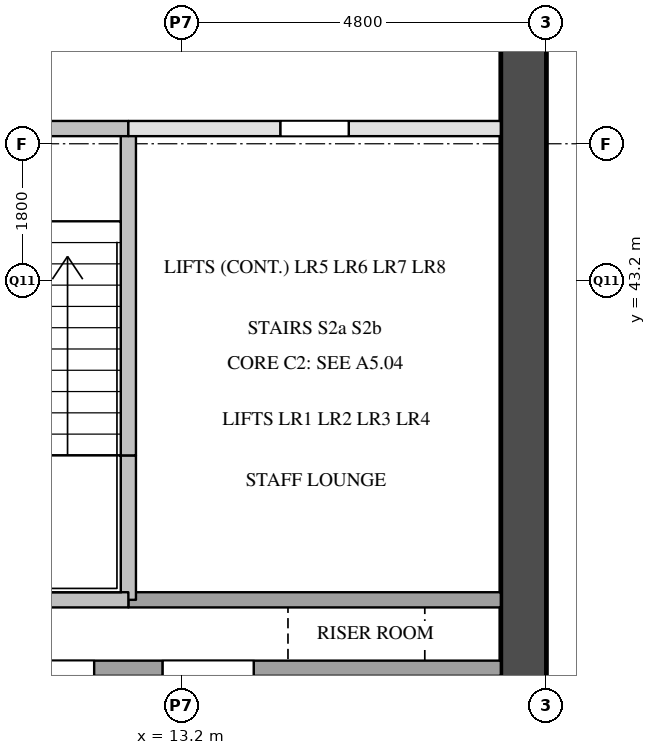
"""IFC4 building model, lengths in metres.
Left out: names, types, materials, properties, quantities, classifications, styles, units other than length and angle.
Written with IfcOpenShell. Run it as: python <this file> out.ifc"""

import sys

from ifc_helpers import new_model, si_unit, direction, frame, frame_2d, origin, place, context, subcontext, project, spatial, rectangle, extrude, element, fill, save


model = new_model("IFC4")
c1 = context("Model", 3, precision=1e-05, world=origin(), true_north=direction((0.0, 1.0)))
c2 = subcontext(c1, "Body", "Model", "MODEL_VIEW")
j1 = project(units=[si_unit("LENGTHUNIT", "METRE"), si_unit("PLANEANGLEUNIT", "RADIAN")], contexts=[c1])
p1 = place(None, origin())
s1 = spatial("IfcSite", under=j1, at=p1, CompositionType="ELEMENT")
p2 = place(p1, origin())
s2 = spatial("IfcBuilding", under=s1, at=p2, CompositionType="ELEMENT")
p3 = place(p2, frame((0.0, 0.0, 100.6)))
s3 = spatial("IfcBuildingStorey", under=s2, at=p3, CompositionType="ELEMENT", Elevation=100.6)
p4 = place(p3, frame((17.7, 29.1, 0.0), z_axis=(0.0, 0.0, 1.0), x_axis=(0.0, 1.0, 0.0)))
e1 = element("IfcWall", 1, at=p4, inside=s3, PredefinedType="SHEAR", context=c2, shape_type="SweptSolid", body=[
    extrude(rectangle(XDim=20.3, YDim=0.6, at=frame_2d((10.15, 0.0))), origin(), (0.0, 0.0, 1.0), 3.5),
])
p5 = place(p4, frame((1.25, 0.0, 0.0)))
e2 = element("IfcOpeningElement", 2, at=p5, cuts=e1, PredefinedType="OPENING", context=c2, shape_type="SweptSolid", body=[
    extrude(rectangle(XDim=0.7, YDim=2.1, at=frame_2d((0.35, 1.05))), frame((0.0, 0.31, 0.0), z_axis=(0.0, -1.0, 0.0), x_axis=(1.0, 0.0, 0.0)), (0.0, 0.0, 1.0), 0.62),
])
p6 = place(p4, frame((7.05, 0.0, 0.0)))
e3 = element("IfcOpeningElement", 3, at=p6, cuts=e1, PredefinedType="OPENING", context=c2, shape_type="SweptSolid", body=[
    extrude(rectangle(XDim=0.7, YDim=2.1, at=frame_2d((0.35, 1.05))), frame((0.0, 0.31, 0.0), z_axis=(0.0, -1.0, 0.0), x_axis=(1.0, 0.0, 0.0)), (0.0, 0.0, 1.0), 0.62),
])
p7 = place(p3, frame((12.5, 34.9, 0.0), z_axis=(0.0, 0.0, 1.0), x_axis=(0.0, 1.0, 0.0)))
e4 = element("IfcWall", 4, at=p7, inside=s3, PredefinedType="SOLIDWALL", context=c2, shape_type="SweptSolid", body=[
    extrude(rectangle(XDim=3.2, YDim=0.2, at=frame_2d((1.6, 0.0))), origin(), (0.0, 0.0, 1.0), 3.5),
])
p8 = place(p3, frame((12.5, 39.0, 0.0), z_axis=(0.0, 0.0, 1.0), x_axis=(0.0, 1.0, 0.0)))
e5 = element("IfcWall", 5, at=p8, inside=s3, PredefinedType="SOLIDWALL", context=c2, shape_type="SweptSolid", body=[
    extrude(rectangle(XDim=1.9, YDim=0.2, at=frame_2d((0.95, 0.0))), origin(), (0.0, 0.0, 1.0), 3.5),
])
p9 = place(p3, frame((12.5, 40.9, 0.0), z_axis=(0.0, 0.0, 1.0), x_axis=(0.0, 1.0, 0.0)))
e6 = element("IfcWall", 6, at=p9, inside=s3, PredefinedType="SOLIDWALL", context=c2, shape_type="SweptSolid", body=[
    extrude(rectangle(XDim=4.3, YDim=0.2, at=frame_2d((2.15, 0.0))), origin(), (0.0, 0.0, 1.0), 3.5),
])
for number, where, z_axis, x_axis in (
    (7, (14.6, 34.9, 0.0), (0.0, 0.0, 1.0), (0.0, 1.0, 0.0)),
    (8, (16.7, 34.9, 0.0), (0.0, 0.0, 1.0), (0.0, 1.0, 0.0)),
):
    element("IfcWall", number, at=place(p3, frame(where, z_axis=z_axis, x_axis=x_axis)), inside=s3, PredefinedType="SOLIDWALL", context=c2, shape_type="SweptSolid", body=[
        extrude(rectangle(XDim=3.2, YDim=0.2, at=frame_2d((1.6, 0.0))), origin(), (0.0, 0.0, 1.0), 3.5),
    ])
p10 = place(p3, frame((6.2, 38.1, 0.0), z_axis=(0.0, 0.0, 1.0), x_axis=(1.0, 0.0, 0.0)))
e9 = element("IfcWall", 9, at=p10, inside=s3, PredefinedType="SOLIDWALL", context=c2, shape_type="SweptSolid", body=[
    extrude(rectangle(XDim=11.2, YDim=0.2, at=frame_2d((5.6, 0.0))), origin(), (0.0, 0.0, 1.0), 3.5),
])
p11 = place(p10, frame((0.45, 0.0, 0.0)))
e10 = element("IfcOpeningElement", 10, at=p11, cuts=e9, PredefinedType="OPENING", context=c2, shape_type="SweptSolid", body=[
    extrude(rectangle(XDim=1.2, YDim=2.1, at=frame_2d((0.6, 1.05))), frame((0.0, 0.11, 0.0), z_axis=(0.0, -1.0, 0.0), x_axis=(1.0, 0.0, 0.0)), (0.0, 0.0, 1.0), 0.22),
])
p12 = place(p10, frame((2.55, 0.0, 0.0)))
e11 = element("IfcOpeningElement", 11, at=p12, cuts=e9, PredefinedType="OPENING", context=c2, shape_type="SweptSolid", body=[
    extrude(rectangle(XDim=1.2, YDim=2.1, at=frame_2d((0.6, 1.05))), frame((0.0, 0.11, 0.0), z_axis=(0.0, -1.0, 0.0), x_axis=(1.0, 0.0, 0.0)), (0.0, 0.0, 1.0), 0.22),
])
p13 = place(p10, frame((4.65, 0.0, 0.0)))
e12 = element("IfcOpeningElement", 12, at=p13, cuts=e9, PredefinedType="OPENING", context=c2, shape_type="SweptSolid", body=[
    extrude(rectangle(XDim=1.2, YDim=2.1, at=frame_2d((0.6, 1.05))), frame((0.0, 0.11, 0.0), z_axis=(0.0, -1.0, 0.0), x_axis=(1.0, 0.0, 0.0)), (0.0, 0.0, 1.0), 0.22),
])
p14 = place(p10, frame((6.75, 0.0, 0.0)))
e13 = element("IfcOpeningElement", 13, at=p14, cuts=e9, PredefinedType="OPENING", context=c2, shape_type="SweptSolid", body=[
    extrude(rectangle(XDim=1.2, YDim=2.1, at=frame_2d((0.6, 1.05))), frame((0.0, 0.11, 0.0), z_axis=(0.0, -1.0, 0.0), x_axis=(1.0, 0.0, 0.0)), (0.0, 0.0, 1.0), 0.22),
])
p15 = place(p3, frame((12.5, 39.0, 0.0), z_axis=(0.0, 0.0, 1.0), x_axis=(1.0, 0.0, 0.0)))
e14 = element("IfcWall", 14, at=p15, inside=s3, PredefinedType="SOLIDWALL", context=c2, shape_type="SweptSolid", body=[
    extrude(rectangle(XDim=4.9, YDim=0.2, at=frame_2d((2.45, 0.0))), origin(), (0.0, 0.0, 1.0), 3.5),
])
p16 = place(p3, frame((9.45, 39.0, 0.0), z_axis=(0.0, 0.0, 1.0), x_axis=(1.0, 0.0, 0.0)))
e15 = element("IfcWall", 15, at=p16, inside=s3, PredefinedType="SOLIDWALL", context=c2, shape_type="SweptSolid", body=[
    extrude(rectangle(XDim=3.05, YDim=0.2, at=frame_2d((1.525, 0.0))), origin(), (0.0, 0.0, 1.0), 3.5),
])
p17 = place(p3, frame((12.5, 45.2, 0.0), z_axis=(0.0, 0.0, 1.0), x_axis=(1.0, 0.0, 0.0)))
e16 = element("IfcWall", 16, at=p17, inside=s3, PredefinedType="PARTITIONING", context=c2, shape_type="SweptSolid", body=[
    extrude(rectangle(XDim=4.9, YDim=0.2, at=frame_2d((2.45, 0.0))), origin(), (0.0, 0.0, 1.0), 3.5),
])
p18 = place(p17, frame((2.0, 0.0, 0.0)))
e17 = element("IfcOpeningElement", 17, at=p18, cuts=e16, PredefinedType="OPENING", context=c2, shape_type="SweptSolid", body=[
    extrude(rectangle(XDim=0.9, YDim=2.1, at=frame_2d((0.45, 1.05))), frame((0.0, 0.11, 0.0), z_axis=(0.0, -1.0, 0.0), x_axis=(1.0, 0.0, 0.0)), (0.0, 0.0, 1.0), 0.22),
])
p19 = place(p3, frame((6.2, 45.2, 0.0), z_axis=(0.0, 0.0, 1.0), x_axis=(1.0, 0.0, 0.0)))
e18 = element("IfcWall", 18, at=p19, inside=s3, PredefinedType="SOLIDWALL", context=c2, shape_type="SweptSolid", body=[
    extrude(rectangle(XDim=6.3, YDim=0.2, at=frame_2d((3.15, 0.0))), origin(), (0.0, 0.0, 1.0), 3.5),
])
p20 = place(p19, frame((1.025, 0.0, 0.0)))
e19 = element("IfcOpeningElement", 19, at=p20, cuts=e18, PredefinedType="OPENING", context=c2, shape_type="SweptSolid", body=[
    extrude(rectangle(XDim=1.1, YDim=2.1, at=frame_2d((0.55, 1.05))), frame((0.0, 0.11, 0.0), z_axis=(0.0, -1.0, 0.0), x_axis=(1.0, 0.0, 0.0)), (0.0, 0.0, 1.0), 0.22),
])
p21 = place(p19, frame((4.175, 0.0, 0.0)))
e20 = element("IfcOpeningElement", 20, at=p21, cuts=e18, PredefinedType="OPENING", context=c2, shape_type="SweptSolid", body=[
    extrude(rectangle(XDim=1.1, YDim=2.1, at=frame_2d((0.55, 1.05))), frame((0.0, 0.11, 0.0), z_axis=(0.0, -1.0, 0.0), x_axis=(1.0, 0.0, 0.0)), (0.0, 0.0, 1.0), 0.22),
])
p22 = place(p13, origin())
e21 = element("IfcDoor", 21, at=p22, inside=s3, OperationType="SLIDING_TO_LEFT", PredefinedType="DOOR", context=c2, shape_type="SweptSolid", body=[
    extrude(rectangle(XDim=1.2, YDim=2.1, at=frame_2d((0.6, 1.05))), frame((0.0, 0.025, 0.0), z_axis=(0.0, -1.0, 0.0), x_axis=(1.0, 0.0, 0.0)), (0.0, 0.0, 1.0), 0.05),
])
fill(e12, e21)
p23 = place(p14, origin())
e22 = element("IfcDoor", 22, at=p23, inside=s3, OperationType="SLIDING_TO_LEFT", PredefinedType="DOOR", context=c2, shape_type="SweptSolid", body=[
    extrude(rectangle(XDim=1.2, YDim=2.1, at=frame_2d((0.6, 1.05))), frame((0.0, 0.025, 0.0), z_axis=(0.0, -1.0, 0.0), x_axis=(1.0, 0.0, 0.0)), (0.0, 0.0, 1.0), 0.05),
])
fill(e13, e22)
p24 = place(p18, origin())
e23 = element("IfcDoor", 23, at=p24, inside=s3, OperationType="SINGLE_SWING_RIGHT", PredefinedType="DOOR", context=c2, shape_type="SweptSolid", body=[
    extrude(rectangle(XDim=0.9, YDim=2.1, at=frame_2d((0.45, 1.05))), frame((0.0, 0.025, 0.0), z_axis=(0.0, -1.0, 0.0), x_axis=(1.0, 0.0, 0.0)), (0.0, 0.0, 1.0), 0.05),
])
fill(e17, e23)
save(model, sys.argv[1])
